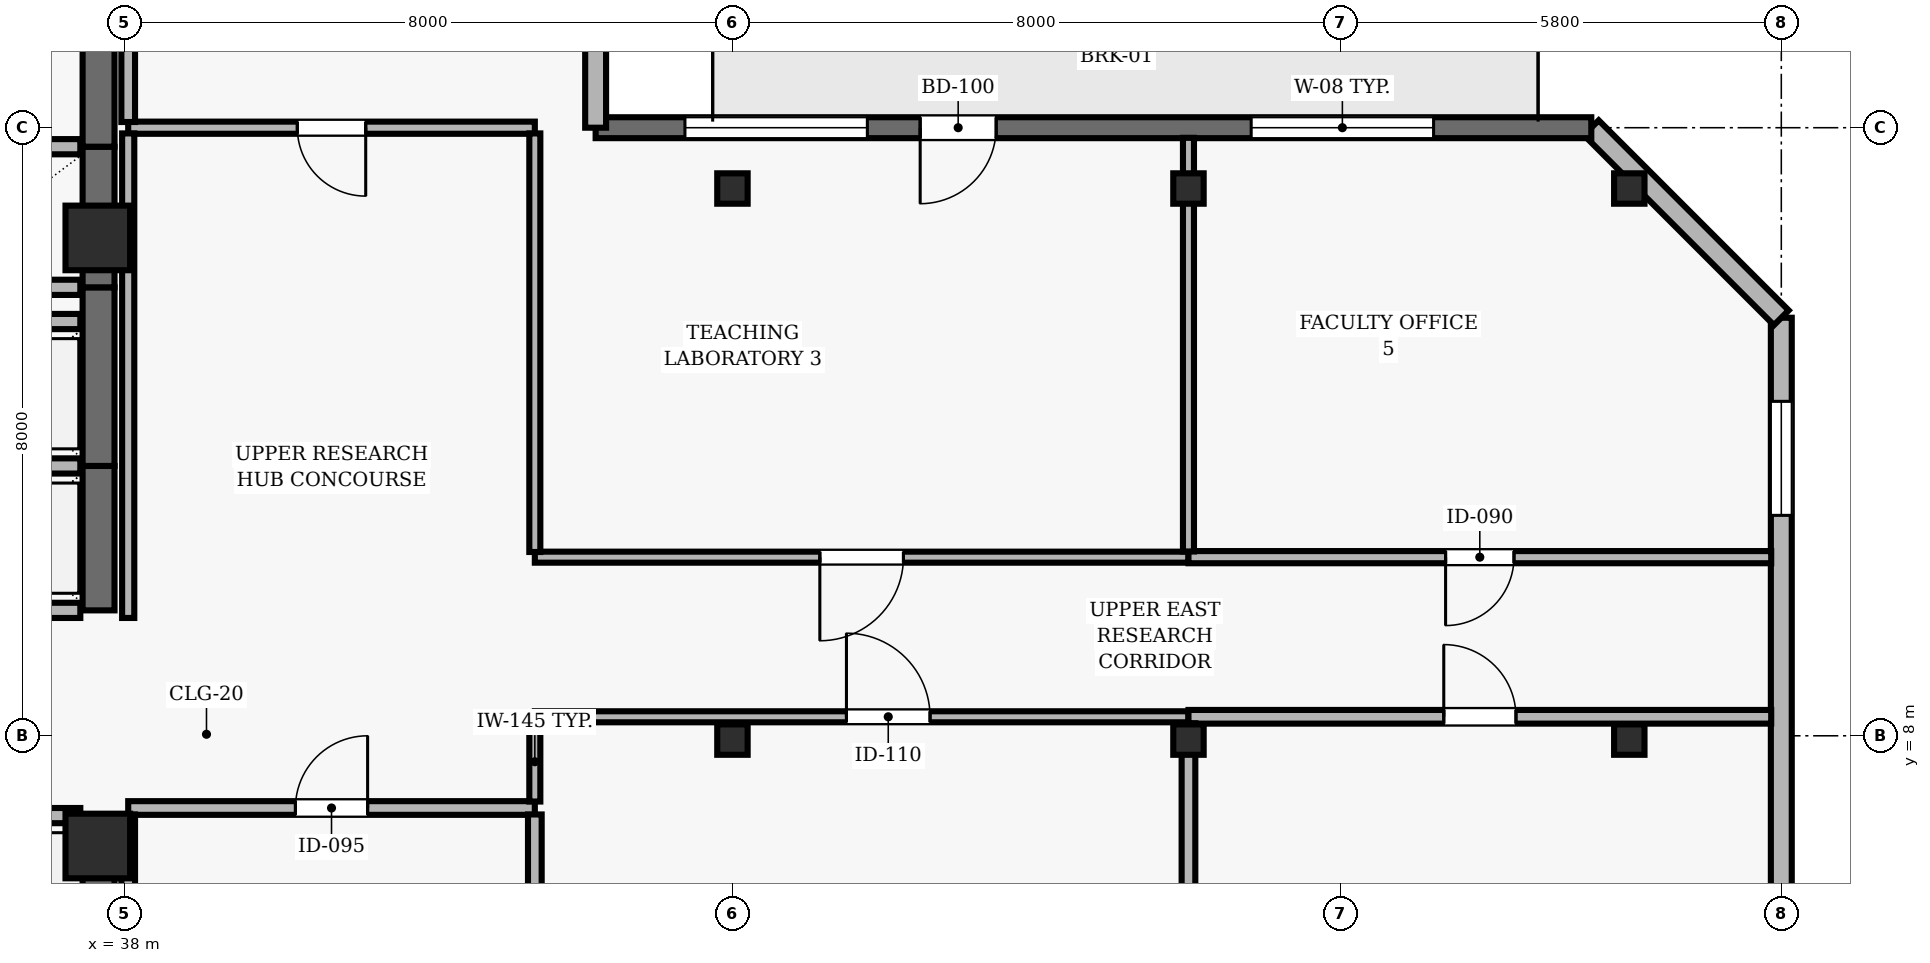
"""IFC4 building model, lengths in metres.
Left out: names, types, materials, properties, quantities, classifications, styles, units other than length and angle.
Written with IfcOpenShell. Run it as: python <this file> out.ifc"""

import sys

from ifc_helpers import new_model, si_unit, direction, frame, frame_2d, origin, origin_2d, place, context, subcontext, project, spatial, rectangle, hollow_rectangle, extrude, element, fill, save


model = new_model("IFC4")
c1 = context("Model", 3, precision=1e-05, world=origin(), true_north=direction((0.0, 1.0)))
c2 = subcontext(c1, "Body", "Model", "MODEL_VIEW")
j1 = project(units=[si_unit("LENGTHUNIT", "METRE"), si_unit("PLANEANGLEUNIT", "RADIAN")], contexts=[c1])
p1 = place(None, origin())
s1 = spatial("IfcSite", under=j1, at=p1, CompositionType="ELEMENT")
p2 = place(p1, origin())
s2 = spatial("IfcBuilding", under=s1, at=p2, CompositionType="ELEMENT")
p3 = place(p2, frame((0.0, 0.0, 259.9)))
s3 = spatial("IfcBuildingStorey", under=s2, at=p3, CompositionType="ELEMENT", Elevation=259.9)
for number, where, z_axis, x_axis in (
    (1, (37.65, 6.55, 0.0), (0.0, 0.0, 1.0), (1.0, 0.0, 0.0)),
    (2, (37.65, 14.55, 0.0), (0.0, 0.0, 1.0), (1.0, 0.0, 0.0)),
):
    element("IfcColumn", number, at=place(p3, frame(where, z_axis=z_axis, x_axis=x_axis)), inside=s3, PredefinedType="COLUMN", context=c2, shape_type="SweptSolid", body=[
        extrude(rectangle(XDim=0.85, YDim=0.85, at=origin_2d()), origin(), (0.0, 0.0, 1.0), 3.9),
    ])
for number, where, z_axis, x_axis in (
    (3, (46.0, 7.95, 0.0), (0.0, 0.0, 1.0), (1.0, 0.0, 0.0)),
    (4, (46.0, 15.2, 0.0), (0.0, 0.0, 1.0), (1.0, 0.0, 0.0)),
    (5, (52.0, 7.95, 0.0), (0.0, 0.0, 1.0), (1.0, 0.0, 0.0)),
    (6, (52.0, 15.2, 0.0), (0.0, 0.0, 1.0), (1.0, 0.0, 0.0)),
    (7, (57.8, 7.95, 0.0), (0.0, 0.0, 1.0), (1.0, 0.0, 0.0)),
    (8, (57.8, 15.2, 0.0), (0.0, 0.0, 1.0), (1.0, 0.0, 0.0)),
):
    element("IfcColumn", number, at=place(p3, frame(where, z_axis=z_axis, x_axis=x_axis)), inside=s3, PredefinedType="COLUMN", context=c2, shape_type="SweptSolid", body=[
        extrude(hollow_rectangle(XDim=0.4, YDim=0.4, WallThickness=0.02, at=origin_2d()), origin(), (0.0, 0.0, 1.0), 3.9),
    ])
p4 = place(p3, frame((59.8, 2.5, 0.0), z_axis=(0.0, 0.0, 1.0), x_axis=(0.0, 1.0, 0.0)))
e9 = element("IfcWall", 9, at=p4, inside=s3, PredefinedType="SOLIDWALL", context=c2, shape_type="SweptSolid", body=[
    extrude(rectangle(XDim=11.0, YDim=0.275, at=frame_2d((5.5, 0.0))), origin(), (0.0, 0.0, 1.0), 3.69),
])
p5 = place(p4, frame((2.0, 0.0, 0.9)))
e10 = element("IfcOpeningElement", 10, at=p5, cuts=e9, PredefinedType="OPENING", context=c2, shape_type="SweptSolid", body=[
    extrude(rectangle(XDim=1.5, YDim=1.8, at=frame_2d((0.75, 0.9))), frame((0.0, 0.147, 0.0), z_axis=(0.0, -1.0, 0.0), x_axis=(1.0, 0.0, 0.0)), (0.0, 0.0, 1.0), 0.295),
])
p6 = place(p4, frame((8.4, 0.0, 0.9)))
e11 = element("IfcOpeningElement", 11, at=p6, cuts=e9, PredefinedType="OPENING", context=c2, shape_type="SweptSolid", body=[
    extrude(rectangle(XDim=1.5, YDim=1.8, at=frame_2d((0.75, 0.9))), frame((0.0, 0.147, 0.0), z_axis=(0.0, -1.0, 0.0), x_axis=(1.0, 0.0, 0.0)), (0.0, 0.0, 1.0), 0.295),
])
p7 = place(p3, frame((59.8, 13.5, 0.0), z_axis=(0.0, 0.0, 1.0), x_axis=(-0.707106781187, 0.707106781187, 0.0)))
e12 = element("IfcWall", 12, at=p7, inside=s3, PredefinedType="SOLIDWALL", context=c2, shape_type="SweptSolid", body=[
    extrude(rectangle(XDim=3.536, YDim=0.275, at=frame_2d((1.768, 0.0))), origin(), (0.0, 0.0, 1.0), 3.69),
])
p8 = place(p3, frame((57.3, 16.0, 0.0), z_axis=(0.0, 0.0, 1.0), x_axis=(-1.0, 0.0, 0.0)))
e13 = element("IfcWall", 13, at=p8, inside=s3, PredefinedType="SOLIDWALL", context=c2, shape_type="SweptSolid", body=[
    extrude(rectangle(XDim=13.1, YDim=0.275, at=frame_2d((6.55, 0.0))), origin(), (0.0, 0.0, 1.0), 3.69),
])
p9 = place(p8, frame((7.83, 0.0, 0.0)))
e14 = element("IfcOpeningElement", 14, at=p9, cuts=e13, PredefinedType="OPENING", context=c2, shape_type="SweptSolid", body=[
    extrude(rectangle(XDim=1.0, YDim=2.2, at=frame_2d((0.5, 1.1))), frame((0.0, 0.147, 0.0), z_axis=(0.0, -1.0, 0.0), x_axis=(1.0, 0.0, 0.0)), (0.0, 0.0, 1.0), 0.295),
])
p10 = place(p8, frame((2.075, 0.0, 0.9)))
e15 = element("IfcOpeningElement", 15, at=p10, cuts=e13, PredefinedType="OPENING", context=c2, shape_type="SweptSolid", body=[
    extrude(rectangle(XDim=2.4, YDim=1.8, at=frame_2d((1.2, 0.9))), frame((0.0, 0.147, 0.0), z_axis=(0.0, -1.0, 0.0), x_axis=(1.0, 0.0, 0.0)), (0.0, 0.0, 1.0), 0.295),
])
p11 = place(p8, frame((9.525, 0.0, 0.9)))
e16 = element("IfcOpeningElement", 16, at=p11, cuts=e13, PredefinedType="OPENING", context=c2, shape_type="SweptSolid", body=[
    extrude(rectangle(XDim=2.4, YDim=1.8, at=frame_2d((1.2, 0.9))), frame((0.0, 0.147, 0.0), z_axis=(0.0, -1.0, 0.0), x_axis=(1.0, 0.0, 0.0)), (0.0, 0.0, 1.0), 0.295),
])
p12 = place(p3, frame((44.2, 16.0, 0.0), z_axis=(0.0, 0.0, 1.0), x_axis=(0.0, 1.0, 0.0)))
e17 = element("IfcWall", 17, at=p12, inside=s3, PredefinedType="SOLIDWALL", context=c2, shape_type="SweptSolid", body=[
    extrude(rectangle(XDim=6.85, YDim=0.275, at=frame_2d((3.425, 0.0))), origin(), (0.0, 0.0, 1.0), 3.69),
])
p13 = place(p12, frame((2.025, 0.0, 0.9)))
e18 = element("IfcOpeningElement", 18, at=p13, cuts=e17, PredefinedType="OPENING", context=c2, shape_type="SweptSolid", body=[
    extrude(rectangle(XDim=2.8, YDim=1.8, at=frame_2d((1.4, 0.9))), frame((0.0, 0.147, 0.0), z_axis=(0.0, -1.0, 0.0), x_axis=(1.0, 0.0, 0.0)), (0.0, 0.0, 1.0), 0.295),
])
p14 = place(p3, frame((37.66, 4.7, 0.0), z_axis=(0.0, 0.0, 1.0), x_axis=(0.0, 1.0, 0.0)))
e19 = element("IfcWall", 19, at=p14, inside=s3, PredefinedType="SHEAR", context=c2, shape_type="SweptSolid", body=[
    extrude(rectangle(XDim=2.25, YDim=0.42, at=frame_2d((1.125, 0.0))), origin(), (0.0, 0.0, 1.0), 3.69),
])
p15 = place(p3, frame((37.42, 6.95, 0.0), z_axis=(0.0, 0.0, 1.0), x_axis=(-1.0, 0.0, 0.0)))
e20 = element("IfcWall", 20, at=p15, inside=s3, PredefinedType="SOLIDWALL", context=c2, shape_type="SweptSolid", body=[
    extrude(rectangle(XDim=2.14, YDim=0.2, at=frame_2d((1.07, 0.0))), origin(), (0.0, 0.0, 1.0), 3.69),
])
p16 = place(p3, frame((37.66, 9.65, 0.0), z_axis=(0.0, 0.0, 1.0), x_axis=(0.0, 1.0, 0.0)))
e21 = element("IfcWall", 21, at=p16, inside=s3, PredefinedType="SHEAR", context=c2, shape_type="SweptSolid", body=[
    extrude(rectangle(XDim=1.9, YDim=0.42, at=frame_2d((0.95, 0.0))), origin(), (0.0, 0.0, 1.0), 3.69),
])
for number, where, z_axis, x_axis in (
    (22, (35.28, 9.65, 0.0), (0.0, 0.0, 1.0), (1.0, 0.0, 0.0)),
    (23, (37.42, 11.55, 0.0), (0.0, 0.0, 1.0), (-1.0, 0.0, 0.0)),
):
    element("IfcWall", number, at=place(p3, frame(where, z_axis=z_axis, x_axis=x_axis)), inside=s3, PredefinedType="SOLIDWALL", context=c2, shape_type="SweptSolid", body=[
        extrude(rectangle(XDim=2.14, YDim=0.2, at=frame_2d((1.07, 0.0))), origin(), (0.0, 0.0, 1.0), 3.69),
    ])
p17 = place(p3, frame((37.66, 11.55, 0.0), z_axis=(0.0, 0.0, 1.0), x_axis=(0.0, 1.0, 0.0)))
e24 = element("IfcWall", 24, at=p17, inside=s3, PredefinedType="SHEAR", context=c2, shape_type="SweptSolid", body=[
    extrude(rectangle(XDim=2.35, YDim=0.42, at=frame_2d((1.175, 0.0))), origin(), (0.0, 0.0, 1.0), 3.69),
])
p18 = place(p3, frame((37.42, 13.45, 0.0), z_axis=(0.0, 0.0, 1.0), x_axis=(-1.0, 0.0, 0.0)))
e25 = element("IfcWall", 25, at=p18, inside=s3, PredefinedType="SOLIDWALL", context=c2, shape_type="SweptSolid", body=[
    extrude(rectangle(XDim=2.14, YDim=0.2, at=frame_2d((1.07, 0.0))), origin(), (0.0, 0.0, 1.0), 3.69),
])
p19 = place(p3, frame((37.66, 13.9, 0.0), z_axis=(0.0, 0.0, 1.0), x_axis=(0.0, 1.0, 0.0)))
e26 = element("IfcWall", 26, at=p19, inside=s3, PredefinedType="SHEAR", context=c2, shape_type="SweptSolid", body=[
    extrude(rectangle(XDim=1.85, YDim=0.42, at=frame_2d((0.925, 0.0))), origin(), (0.0, 0.0, 1.0), 3.69),
])
for number, where, z_axis, x_axis in (
    (27, (35.28, 13.9, 0.0), (0.0, 0.0, 1.0), (1.0, 0.0, 0.0)),
    (28, (37.42, 15.75, 0.0), (0.0, 0.0, 1.0), (-1.0, 0.0, 0.0)),
):
    element("IfcWall", number, at=place(p3, frame(where, z_axis=z_axis, x_axis=x_axis)), inside=s3, PredefinedType="SOLIDWALL", context=c2, shape_type="SweptSolid", body=[
        extrude(rectangle(XDim=2.14, YDim=0.2, at=frame_2d((1.07, 0.0))), origin(), (0.0, 0.0, 1.0), 3.69),
    ])
p20 = place(p3, frame((37.66, 15.75, 0.0), z_axis=(0.0, 0.0, 1.0), x_axis=(0.0, 1.0, 0.0)))
e29 = element("IfcWall", 29, at=p20, inside=s3, PredefinedType="SHEAR", context=c2, shape_type="SweptSolid", body=[
    extrude(rectangle(XDim=1.85, YDim=0.42, at=frame_2d((0.925, 0.0))), origin(), (0.0, 0.0, 1.0), 3.69),
])
p21 = place(p3, frame((38.05, 7.05, 0.0), z_axis=(0.0, 0.0, 1.0), x_axis=(1.0, 0.0, 0.0)))
e30 = element("IfcWall", 30, at=p21, inside=s3, PredefinedType="PARTITIONING", context=c2, shape_type="SweptSolid", body=[
    extrude(rectangle(XDim=5.35, YDim=0.18, at=frame_2d((2.675, 0.0))), origin(), (0.0, 0.0, 1.0), 3.69),
])
p22 = place(p21, frame((2.2, 0.0, 0.0)))
e31 = element("IfcOpeningElement", 31, at=p22, cuts=e30, PredefinedType="OPENING", context=c2, shape_type="SweptSolid", body=[
    extrude(rectangle(XDim=0.95, YDim=2.1, at=frame_2d((0.475, 1.05))), frame((0.0, 0.1, 0.0), z_axis=(0.0, -1.0, 0.0), x_axis=(1.0, 0.0, 0.0)), (0.0, 0.0, 1.0), 0.2),
])
p23 = place(p3, frame((43.4, 8.25, 0.0), z_axis=(0.0, 0.0, 1.0), x_axis=(1.0, 0.0, 0.0)))
e32 = element("IfcWall", 32, at=p23, inside=s3, PredefinedType="PARTITIONING", context=c2, shape_type="SweptSolid", body=[
    extrude(rectangle(XDim=8.6, YDim=0.145, at=frame_2d((4.3, 0.0))), origin(), (0.0, 0.0, 1.0), 3.227),
])
p24 = place(p23, frame((4.1, 0.0, 0.0)))
e33 = element("IfcOpeningElement", 33, at=p24, cuts=e32, PredefinedType="OPENING", context=c2, shape_type="SweptSolid", body=[
    extrude(rectangle(XDim=1.1, YDim=2.15, at=frame_2d((0.55, 1.075))), frame((0.0, 0.083, 0.0), z_axis=(0.0, -1.0, 0.0), x_axis=(1.0, 0.0, 0.0)), (0.0, 0.0, 1.0), 0.165),
])
p25 = place(p3, frame((43.4, 16.0, 0.0), z_axis=(0.0, 0.0, 1.0), x_axis=(-1.0, 0.0, 0.0)))
e34 = element("IfcWall", 34, at=p25, inside=s3, PredefinedType="PARTITIONING", context=c2, shape_type="SweptSolid", body=[
    extrude(rectangle(XDim=5.35, YDim=0.16, at=frame_2d((2.675, 0.0))), origin(), (0.0, 0.0, 1.0), 3.39),
])
p26 = place(p25, frame((2.225, 0.0, 0.0)))
e35 = element("IfcOpeningElement", 35, at=p26, cuts=e34, PredefinedType="OPENING", context=c2, shape_type="SweptSolid", body=[
    extrude(rectangle(XDim=0.9, YDim=2.1, at=frame_2d((0.45, 1.05))), frame((0.0, 0.09, 0.0), z_axis=(0.0, -1.0, 0.0), x_axis=(1.0, 0.0, 0.0)), (0.0, 0.0, 1.0), 0.18),
])
p27 = place(p3, frame((52.0, 8.25, 0.0), z_axis=(0.0, 0.0, 1.0), x_axis=(1.0, 0.0, 0.0)))
e36 = element("IfcWall", 36, at=p27, inside=s3, PredefinedType="PARTITIONING", context=c2, shape_type="SweptSolid", body=[
    extrude(rectangle(XDim=7.667, YDim=0.18, at=frame_2d((3.833, 0.0))), origin(), (0.0, 0.0, 1.0), 3.227),
])
p28 = place(p27, frame((3.359, 0.0, 0.0)))
e37 = element("IfcOpeningElement", 37, at=p28, cuts=e36, PredefinedType="OPENING", context=c2, shape_type="SweptSolid", body=[
    extrude(rectangle(XDim=0.95, YDim=2.1, at=frame_2d((0.475, 1.05))), frame((0.0, 0.1, 0.0), z_axis=(0.0, -1.0, 0.0), x_axis=(1.0, 0.0, 0.0)), (0.0, 0.0, 1.0), 0.2),
])
p29 = place(p3, frame((52.0, 10.35, 0.0), z_axis=(0.0, 0.0, 1.0), x_axis=(-1.0, 0.0, 0.0)))
e38 = element("IfcWall", 38, at=p29, inside=s3, PredefinedType="PARTITIONING", context=c2, shape_type="SweptSolid", body=[
    extrude(rectangle(XDim=8.6, YDim=0.145, at=frame_2d((4.3, 0.0))), origin(), (0.0, 0.0, 1.0), 3.424),
])
p30 = place(p29, frame((3.75, 0.0, 0.0)))
e39 = element("IfcOpeningElement", 39, at=p30, cuts=e38, PredefinedType="OPENING", context=c2, shape_type="SweptSolid", body=[
    extrude(rectangle(XDim=1.1, YDim=2.15, at=frame_2d((0.55, 1.075))), frame((0.0, 0.083, 0.0), z_axis=(0.0, -1.0, 0.0), x_axis=(1.0, 0.0, 0.0)), (0.0, 0.0, 1.0), 0.165),
])
p31 = place(p3, frame((59.667, 10.35, 0.0), z_axis=(0.0, 0.0, 1.0), x_axis=(-1.0, 0.0, 0.0)))
e40 = element("IfcWall", 40, at=p31, inside=s3, PredefinedType="PARTITIONING", context=c2, shape_type="SweptSolid", body=[
    extrude(rectangle(XDim=7.667, YDim=0.16, at=frame_2d((3.833, 0.0))), origin(), (0.0, 0.0, 1.0), 3.424),
])
p32 = place(p31, frame((3.384, 0.0, 0.0)))
e41 = element("IfcOpeningElement", 41, at=p32, cuts=e40, PredefinedType="OPENING", context=c2, shape_type="SweptSolid", body=[
    extrude(rectangle(XDim=0.9, YDim=2.1, at=frame_2d((0.45, 1.05))), frame((0.0, 0.09, 0.0), z_axis=(0.0, -1.0, 0.0), x_axis=(1.0, 0.0, 0.0)), (0.0, 0.0, 1.0), 0.18),
])
p33 = place(p3, frame((38.05, 6.965, 0.0), z_axis=(0.0, 0.0, 1.0), x_axis=(0.0, -1.0, 0.0)))
e42 = element("IfcWall", 42, at=p33, inside=s3, PredefinedType="PARTITIONING", context=c2, shape_type="SweptSolid", body=[
    extrude(rectangle(XDim=6.832, YDim=0.18, at=frame_2d((3.416, 0.0))), origin(), (0.0, 0.0, 1.0), 3.227),
])
p34 = place(p3, frame((38.05, 15.925, 0.0), z_axis=(0.0, 0.0, 1.0), x_axis=(0.0, -1.0, 0.0)))
e43 = element("IfcWall", 43, at=p34, inside=s3, PredefinedType="PARTITIONING", context=c2, shape_type="SweptSolid", body=[
    extrude(rectangle(XDim=6.375, YDim=0.16, at=frame_2d((3.188, 0.0))), origin(), (0.0, 0.0, 1.0), 3.227),
])
p35 = place(p3, frame((38.05, 23.918, 0.0), z_axis=(0.0, 0.0, 1.0), x_axis=(0.0, -1.0, 0.0)))
e44 = element("IfcWall", 44, at=p35, inside=s3, PredefinedType="PARTITIONING", context=c2, shape_type="SweptSolid", body=[
    extrude(rectangle(XDim=7.843, YDim=0.18, at=frame_2d((3.921, 0.0))), origin(), (0.0, 0.0, 1.0), 3.227),
])
p36 = place(p3, frame((43.4, 0.133, 0.0), z_axis=(0.0, 0.0, 1.0), x_axis=(0.0, 1.0, 0.0)))
e45 = element("IfcWall", 45, at=p36, inside=s3, PredefinedType="PARTITIONING", context=c2, shape_type="SweptSolid", body=[
    extrude(rectangle(XDim=6.832, YDim=0.18, at=frame_2d((3.416, 0.0))), origin(), (0.0, 0.0, 1.0), 3.69),
])
p37 = place(p3, frame((43.4, 7.135, 0.0), z_axis=(0.0, 0.0, 1.0), x_axis=(0.0, 1.0, 0.0)))
e46 = element("IfcWall", 46, at=p37, inside=s3, PredefinedType="PARTITIONING", context=c2, shape_type="SweptSolid", body=[
    extrude(rectangle(XDim=1.047, YDim=0.145, at=frame_2d((0.523, 0.0))), origin(), (0.0, 0.0, 1.0), 3.69),
])
p38 = place(p3, frame((43.4, 10.418, 0.0), z_axis=(0.0, 0.0, 1.0), x_axis=(0.0, 1.0, 0.0)))
e47 = element("IfcWall", 47, at=p38, inside=s3, PredefinedType="PARTITIONING", context=c2, shape_type="SweptSolid", body=[
    extrude(rectangle(XDim=5.507, YDim=0.145, at=frame_2d((2.753, 0.0))), origin(), (0.0, 0.0, 1.0), 3.69),
])
p39 = place(p3, frame((52.0, 0.133, 0.0), z_axis=(0.0, 0.0, 1.0), x_axis=(0.0, 1.0, 0.0)))
e48 = element("IfcWall", 48, at=p39, inside=s3, PredefinedType="PARTITIONING", context=c2, shape_type="SweptSolid", body=[
    extrude(rectangle(XDim=8.032, YDim=0.18, at=frame_2d((4.016, 0.0))), origin(), (0.0, 0.0, 1.0), 3.227),
])
p40 = place(p3, frame((52.0, 10.425, 0.0), z_axis=(0.0, 0.0, 1.0), x_axis=(0.0, 1.0, 0.0)))
e49 = element("IfcWall", 49, at=p40, inside=s3, PredefinedType="PARTITIONING", context=c2, shape_type="SweptSolid", body=[
    extrude(rectangle(XDim=5.442, YDim=0.145, at=frame_2d((2.721, 0.0))), origin(), (0.0, 0.0, 1.0), 3.227),
])
p41 = place(p6, origin())
e50 = element("IfcWindow", 50, at=p41, inside=s3, PartitioningType="SINGLE_PANEL", PredefinedType="WINDOW", context=c2, shape_type="SweptSolid", body=[
    extrude(rectangle(XDim=1.5, YDim=1.8, at=frame_2d((0.75, 0.9))), frame((0.0, 0.03, 0.0), z_axis=(0.0, -1.0, 0.0), x_axis=(1.0, 0.0, 0.0)), (0.0, 0.0, 1.0), 0.06),
])
fill(e11, e50)
p42 = place(p9, origin())
e51 = element("IfcDoor", 51, at=p42, inside=s3, OperationType="SINGLE_SWING_RIGHT", PredefinedType="DOOR", context=c2, shape_type="SweptSolid", body=[
    extrude(rectangle(XDim=1.0, YDim=2.2, at=frame_2d((0.5, 1.1))), frame((0.0, 0.025, 0.0), z_axis=(0.0, -1.0, 0.0), x_axis=(1.0, 0.0, 0.0)), (0.0, 0.0, 1.0), 0.05),
])
fill(e14, e51)
p43 = place(p10, origin())
e52 = element("IfcWindow", 52, at=p43, inside=s3, PartitioningType="SINGLE_PANEL", PredefinedType="WINDOW", context=c2, shape_type="SweptSolid", body=[
    extrude(rectangle(XDim=2.4, YDim=1.8, at=frame_2d((1.2, 0.9))), frame((0.0, 0.03, 0.0), z_axis=(0.0, -1.0, 0.0), x_axis=(1.0, 0.0, 0.0)), (0.0, 0.0, 1.0), 0.06),
])
fill(e15, e52)
p44 = place(p11, origin())
e53 = element("IfcWindow", 53, at=p44, inside=s3, PartitioningType="SINGLE_PANEL", PredefinedType="WINDOW", context=c2, shape_type="SweptSolid", body=[
    extrude(rectangle(XDim=2.4, YDim=1.8, at=frame_2d((1.2, 0.9))), frame((0.0, 0.03, 0.0), z_axis=(0.0, -1.0, 0.0), x_axis=(1.0, 0.0, 0.0)), (0.0, 0.0, 1.0), 0.06),
])
fill(e16, e53)
p45 = place(p22, origin())
e54 = element("IfcDoor", 54, at=p45, inside=s3, OperationType="SINGLE_SWING_RIGHT", PredefinedType="DOOR", context=c2, shape_type="SweptSolid", body=[
    extrude(rectangle(XDim=0.95, YDim=2.1, at=frame_2d((0.475, 1.05))), frame((0.0, 0.025, 0.0), z_axis=(0.0, -1.0, 0.0), x_axis=(1.0, 0.0, 0.0)), (0.0, 0.0, 1.0), 0.05),
])
fill(e31, e54)
p46 = place(p24, origin())
e55 = element("IfcDoor", 55, at=p46, inside=s3, OperationType="SINGLE_SWING_LEFT", PredefinedType="DOOR", context=c2, shape_type="SweptSolid", body=[
    extrude(rectangle(XDim=1.1, YDim=2.15, at=frame_2d((0.55, 1.075))), frame((0.0, 0.025, 0.0), z_axis=(0.0, -1.0, 0.0), x_axis=(1.0, 0.0, 0.0)), (0.0, 0.0, 1.0), 0.05),
])
fill(e33, e55)
p47 = place(p30, origin())
e56 = element("IfcDoor", 56, at=p47, inside=s3, OperationType="SINGLE_SWING_RIGHT", PredefinedType="DOOR", context=c2, shape_type="SweptSolid", body=[
    extrude(rectangle(XDim=1.1, YDim=2.15, at=frame_2d((0.55, 1.075))), frame((0.0, 0.025, 0.0), z_axis=(0.0, -1.0, 0.0), x_axis=(1.0, 0.0, 0.0)), (0.0, 0.0, 1.0), 0.05),
])
fill(e39, e56)
p48 = place(p28, origin())
e57 = element("IfcDoor", 57, at=p48, inside=s3, OperationType="SINGLE_SWING_LEFT", PredefinedType="DOOR", context=c2, shape_type="SweptSolid", body=[
    extrude(rectangle(XDim=0.95, YDim=2.1, at=frame_2d((0.475, 1.05))), frame((0.0, 0.025, 0.0), z_axis=(0.0, -1.0, 0.0), x_axis=(1.0, 0.0, 0.0)), (0.0, 0.0, 1.0), 0.05),
])
fill(e37, e57)
p49 = place(p32, origin())
e58 = element("IfcDoor", 58, at=p49, inside=s3, OperationType="SINGLE_SWING_RIGHT", PredefinedType="DOOR", context=c2, shape_type="SweptSolid", body=[
    extrude(rectangle(XDim=0.9, YDim=2.1, at=frame_2d((0.45, 1.05))), frame((0.0, 0.025, 0.0), z_axis=(0.0, -1.0, 0.0), x_axis=(1.0, 0.0, 0.0)), (0.0, 0.0, 1.0), 0.05),
])
fill(e41, e58)
p50 = place(p26, origin())
e59 = element("IfcDoor", 59, at=p50, inside=s3, OperationType="SINGLE_SWING_LEFT", PredefinedType="DOOR", context=c2, shape_type="SweptSolid", body=[
    extrude(rectangle(XDim=0.9, YDim=2.1, at=frame_2d((0.45, 1.05))), frame((0.0, 0.025, 0.0), z_axis=(0.0, -1.0, 0.0), x_axis=(1.0, 0.0, 0.0)), (0.0, 0.0, 1.0), 0.05),
])
fill(e35, e59)
save(model, sys.argv[1])
